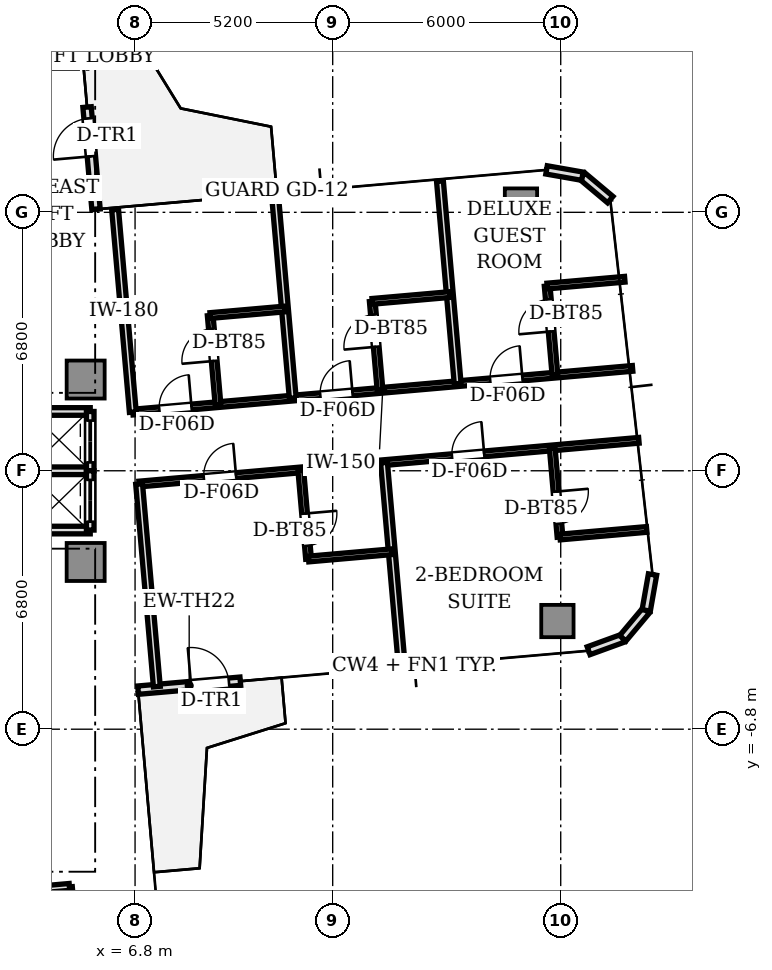
"""IFC4 building model, lengths in metres.
Left out: names, types, materials, properties, quantities, classifications, styles, units other than length and angle.
Written with IfcOpenShell. Run it as: python <this file> out.ifc"""

import sys

from ifc_helpers import new_model, si_unit, direction, frame, frame_2d, origin, origin_2d, place, context, subcontext, project, spatial, rectangle, extrude, source, transform, mapped, element, fill, save


model = new_model("IFC4")
c1 = context("Model", 3, precision=1e-05, world=origin(), true_north=direction((0.0, 1.0)))
c2 = subcontext(c1, "Body", "Model", "MODEL_VIEW")
j1 = project(units=[si_unit("LENGTHUNIT", "METRE"), si_unit("PLANEANGLEUNIT", "RADIAN")], contexts=[c1])
p1 = place(None, origin())
s1 = spatial("IfcSite", under=j1, at=p1, CompositionType="ELEMENT")
p2 = place(p1, origin())
s2 = spatial("IfcBuilding", under=s1, at=p2, CompositionType="ELEMENT")
p3 = place(p2, frame((0.0, 0.0, 191.95)))
s3 = spatial("IfcBuildingStorey", under=s2, at=p3, CompositionType="ELEMENT", Elevation=191.95)
m1 = source(origin(), c2, "Body", "SweptSolid", [
    extrude(rectangle(XDim=1.0, YDim=1.0, at=origin_2d()), origin(), (0.0, 0.0, 1.0), 3.11),
])
for number, where, z_axis, x_axis in (
    (1, (5.5, 2.4, 0.0), (0.0, 0.0, 1.0), (1.0, 0.0, 0.0)),
    (2, (5.5, -2.4, 0.0), (0.0, 0.0, 1.0), (1.0, 0.0, 0.0)),
):
    element("IfcColumn", number, at=place(p3, frame(where, z_axis=z_axis, x_axis=x_axis)), inside=s3, PredefinedType="COLUMN", context=c2, shape_type="MappedRepresentation", body=[
        mapped(m1, transform((0.0, 0.0, 0.0), scale=1.0)),
    ])
m2 = source(origin(), c2, "Body", "SweptSolid", [
    extrude(rectangle(XDim=0.85, YDim=0.85, at=origin_2d()), origin(), (0.0, 0.0, 1.0), 3.11),
])
for number, where, z_axis, x_axis in (
    (3, (17.913, -3.954, 0.0), (0.0, 0.0, 1.0), (1.0, 0.0, 0.0)),
    (4, (16.954, 7.004, 0.0), (0.0, 0.0, 1.0), (1.0, 0.0, 0.0)),
):
    element("IfcColumn", number, at=place(p3, frame(where, z_axis=z_axis, x_axis=x_axis)), inside=s3, PredefinedType="COLUMN", context=c2, shape_type="MappedRepresentation", body=[
        mapped(m2, transform((0.0, 0.0, 0.0), scale=1.0)),
    ])
p4 = place(p3, frame((6.879, -5.772, 0.0), z_axis=(0.0, 0.0, 1.0), x_axis=(0.996193619346, 0.087168071984, 0.0)))
e5 = element("IfcWall", 5, at=p4, inside=s3, PredefinedType="STANDARD", context=c2, shape_type="SweptSolid", body=[
    extrude(rectangle(XDim=2.7, YDim=0.22, at=frame_2d((1.35, 0.0))), origin(), (0.0, 0.0, 1.0), 3.11),
])
p5 = place(p4, frame((1.4, 0.0, 0.0)))
e6 = element("IfcOpeningElement", 6, at=p5, cuts=e5, PredefinedType="OPENING", context=c2, shape_type="SweptSolid", body=[
    extrude(rectangle(XDim=1.0, YDim=2.2, at=frame_2d((0.5, 1.1))), frame((0.0, 0.12, 0.0), z_axis=(0.0, -1.0, 0.0), x_axis=(1.0, 0.0, 0.0)), (0.0, 0.0, 1.0), 0.24),
])
p6 = place(p3, frame((18.734, -4.735, 0.0), z_axis=(0.0, 0.0, 1.0), x_axis=(0.939741306239, 0.34188635151, 0.0)))
e7 = element("IfcWall", 7, at=p6, inside=s3, PredefinedType="STANDARD", context=c2, shape_type="SweptSolid", body=[
    extrude(rectangle(XDim=0.958, YDim=0.22, at=frame_2d((0.479, 0.0))), origin(), (0.0, 0.0, 1.0), 3.11),
])
for number, where, z_axis, x_axis in (
    (8, (19.634, -4.408, 0.0), (0.0, 0.0, 1.0), (0.643, 0.766, 0.0)),
    (9, (20.25, -3.674, 0.0), (0.0, 0.0, 1.0), (0.174, 0.985, 0.0)),
):
    element("IfcWall", number, at=place(p3, frame(where, z_axis=z_axis, x_axis=x_axis)), inside=s3, PredefinedType="STANDARD", context=c2, shape_type="SweptSolid", body=[
        extrude(rectangle(XDim=0.958, YDim=0.22, at=frame_2d((0.479, 0.0))), origin(), (0.0, 0.0, 1.0), 3.11),
    ])
p7 = place(p3, frame((19.304, 7.135, 0.0), z_axis=(0.0, 0.0, 1.0), x_axis=(-0.766001159887, 0.642839189107, 0.0)))
e10 = element("IfcWall", 10, at=p7, inside=s3, PredefinedType="STANDARD", context=c2, shape_type="SweptSolid", body=[
    extrude(rectangle(XDim=0.958, YDim=0.22, at=frame_2d((0.479, 0.0))), origin(), (0.0, 0.0, 1.0), 3.11),
])
p8 = place(p3, frame((18.57, 7.75, 0.0), z_axis=(0.0, 0.0, 1.0), x_axis=(-0.984770724397, 0.173858046606, 0.0)))
e11 = element("IfcWall", 11, at=p8, inside=s3, PredefinedType="STANDARD", context=c2, shape_type="SweptSolid", body=[
    extrude(rectangle(XDim=0.958, YDim=0.22, at=frame_2d((0.479, 0.0))), origin(), (0.0, 0.0, 1.0), 3.11),
])
p9 = place(p3, frame((5.772, 6.879, 0.0), z_axis=(0.0, 0.0, 1.0), x_axis=(-0.087168071984, 0.996193619346, 0.0)))
e12 = element("IfcWall", 12, at=p9, inside=s3, PredefinedType="STANDARD", context=c2, shape_type="SweptSolid", body=[
    extrude(rectangle(XDim=2.7, YDim=0.22, at=frame_2d((1.35, 0.0))), origin(), (0.0, 0.0, 1.0), 3.11),
])
p10 = place(p9, frame((1.4, 0.0, 0.0)))
e13 = element("IfcOpeningElement", 13, at=p10, cuts=e12, PredefinedType="OPENING", context=c2, shape_type="SweptSolid", body=[
    extrude(rectangle(XDim=1.0, YDim=2.2, at=frame_2d((0.5, 1.1))), frame((0.0, 0.12, 0.0), z_axis=(0.0, -1.0, 0.0), x_axis=(1.0, 0.0, 0.0)), (0.0, 0.0, 1.0), 0.24),
])
for number, where, z_axis, x_axis in (
    (14, (3.98, 1.56, 0.0), (0.0, 0.0, 1.0), (1.0, 0.0, 0.0)),
    (15, (3.98, -1.56, 0.0), (0.0, 0.0, 1.0), (1.0, 0.0, 0.0)),
    (16, (3.98, 0.0, 0.0), (0.0, 0.0, 1.0), (1.0, 0.0, 0.0)),
):
    element("IfcWall", number, at=place(p3, frame(where, z_axis=z_axis, x_axis=x_axis)), inside=s3, PredefinedType="SOLIDWALL", context=c2, shape_type="SweptSolid", body=[
        extrude(rectangle(XDim=1.64, YDim=0.2, at=frame_2d((0.82, 0.0))), origin(), (0.0, 0.0, 1.0), 2.66),
    ])
p11 = place(p3, frame((5.62, 0.0, 0.0), z_axis=(0.0, 0.0, 1.0), x_axis=(0.0, 1.0, 0.0)))
e17 = element("IfcWall", 17, at=p11, inside=s3, PredefinedType="SOLIDWALL", context=c2, shape_type="SweptSolid", body=[
    extrude(rectangle(XDim=1.56, YDim=0.2, at=frame_2d((0.78, 0.0))), origin(), (0.0, 0.0, 1.0), 2.66),
])
p12 = place(p11, frame((0.22, 0.0, 0.0)))
e18 = element("IfcOpeningElement", 18, at=p12, cuts=e17, PredefinedType="OPENING", context=c2, shape_type="SweptSolid", body=[
    extrude(rectangle(XDim=1.1, YDim=2.2, at=frame_2d((0.55, 1.1))), frame((0.0, 0.11, 0.0), z_axis=(0.0, -1.0, 0.0), x_axis=(1.0, 0.0, 0.0)), (0.0, 0.0, 1.0), 0.22),
])
p13 = place(p3, frame((5.62, -1.56, 0.0), z_axis=(0.0, 0.0, 1.0), x_axis=(0.0, 1.0, 0.0)))
e19 = element("IfcWall", 19, at=p13, inside=s3, PredefinedType="SOLIDWALL", context=c2, shape_type="SweptSolid", body=[
    extrude(rectangle(XDim=1.56, YDim=0.2, at=frame_2d((0.78, 0.0))), origin(), (0.0, 0.0, 1.0), 2.66),
])
p14 = place(p13, frame((0.22, 0.0, 0.0)))
e20 = element("IfcOpeningElement", 20, at=p14, cuts=e19, PredefinedType="OPENING", context=c2, shape_type="SweptSolid", body=[
    extrude(rectangle(XDim=1.1, YDim=2.2, at=frame_2d((0.55, 1.1))), frame((0.0, 0.11, 0.0), z_axis=(0.0, -1.0, 0.0), x_axis=(1.0, 0.0, 0.0)), (0.0, 0.0, 1.0), 0.22),
])
p15 = place(p3, frame((6.741, 1.543, 0.0), z_axis=(0.0, 0.0, 1.0), x_axis=(0.996195062465, 0.087151577845, 0.0)))
e21 = element("IfcWall", 21, at=p15, inside=s3, PredefinedType="PARTITIONING", context=c2, shape_type="SweptSolid", body=[
    extrude(rectangle(XDim=13.2, YDim=0.15, at=frame_2d((6.6, 0.0))), origin(), (0.0, 0.0, 1.0), 2.66),
])
p16 = place(p15, frame((0.7, 0.0, 0.0)))
e22 = element("IfcOpeningElement", 22, at=p16, cuts=e21, PredefinedType="OPENING", context=c2, shape_type="SweptSolid", body=[
    extrude(rectangle(XDim=0.85, YDim=2.1, at=frame_2d((0.425, 1.05))), frame((0.0, 0.085, 0.0), z_axis=(0.0, -1.0, 0.0), x_axis=(1.0, 0.0, 0.0)), (0.0, 0.0, 1.0), 0.17),
])
p17 = place(p15, frame((4.952, 0.0, 0.0)))
e23 = element("IfcOpeningElement", 23, at=p17, cuts=e21, PredefinedType="OPENING", context=c2, shape_type="SweptSolid", body=[
    extrude(rectangle(XDim=0.85, YDim=2.1, at=frame_2d((0.425, 1.05))), frame((0.0, 0.085, 0.0), z_axis=(0.0, -1.0, 0.0), x_axis=(1.0, 0.0, 0.0)), (0.0, 0.0, 1.0), 0.17),
])
p18 = place(p15, frame((9.44, 0.0, 0.0)))
e24 = element("IfcOpeningElement", 24, at=p18, cuts=e21, PredefinedType="OPENING", context=c2, shape_type="SweptSolid", body=[
    extrude(rectangle(XDim=0.85, YDim=2.1, at=frame_2d((0.425, 1.05))), frame((0.0, 0.085, 0.0), z_axis=(0.0, -1.0, 0.0), x_axis=(1.0, 0.0, 0.0)), (0.0, 0.0, 1.0), 0.17),
])
p19 = place(p3, frame((6.907, -0.349, 0.0), z_axis=(0.0, 0.0, 1.0), x_axis=(0.996195062465, 0.087151577845, 0.0)))
e25 = element("IfcWall", 25, at=p19, inside=s3, PredefinedType="PARTITIONING", context=c2, shape_type="SweptSolid", body=[
    extrude(rectangle(XDim=13.2, YDim=0.15, at=frame_2d((6.6, 0.0))), origin(), (0.0, 0.0, 1.0), 2.66),
])
p20 = place(p19, frame((1.71, 0.0, 0.0)))
e26 = element("IfcOpeningElement", 26, at=p20, cuts=e25, PredefinedType="OPENING", context=c2, shape_type="SweptSolid", body=[
    extrude(rectangle(XDim=0.85, YDim=2.1, at=frame_2d((0.425, 1.05))), frame((0.0, 0.085, 0.0), z_axis=(0.0, -1.0, 0.0), x_axis=(1.0, 0.0, 0.0)), (0.0, 0.0, 1.0), 0.17),
])
p21 = place(p19, frame((8.264, 0.0, 0.0)))
e27 = element("IfcOpeningElement", 27, at=p21, cuts=e25, PredefinedType="OPENING", context=c2, shape_type="SweptSolid", body=[
    extrude(rectangle(XDim=0.85, YDim=2.1, at=frame_2d((0.425, 1.05))), frame((0.0, 0.085, 0.0), z_axis=(0.0, -1.0, 0.0), x_axis=(1.0, 0.0, 0.0)), (0.0, 0.0, 1.0), 0.17),
])
for number, where, z_axis, x_axis in (
    (28, (6.741, 1.543, 0.0), (0.0, 0.0, 1.0), (-0.087, 0.996, 0.0)),
    (29, (7.373, -5.679, 0.0), (0.0, 0.0, 1.0), (-0.087, 0.996, 0.0)),
    (30, (10.949, 1.912, 0.0), (0.0, 0.0, 1.0), (-0.087, 0.996, 0.0)),
):
    element("IfcWall", number, at=place(p3, frame(where, z_axis=z_axis, x_axis=x_axis)), inside=s3, PredefinedType="PARTITIONING", context=c2, shape_type="SweptSolid", body=[
        extrude(rectangle(XDim=5.35, YDim=0.18, at=frame_2d((2.675, 0.0))), origin(), (0.0, 0.0, 1.0), 2.66),
    ])
p22 = place(p3, frame((8.983, 1.74, 0.0), z_axis=(0.0, 0.0, 1.0), x_axis=(-0.087224846905, 0.996188649846, 0.0)))
e31 = element("IfcWall", 31, at=p22, inside=s3, PredefinedType="PARTITIONING", context=c2, shape_type="SweptSolid", body=[
    extrude(rectangle(XDim=2.354, YDim=0.15, at=frame_2d((1.177, 0.0))), origin(), (0.0, 0.0, 1.0), 2.66),
])
p23 = place(p22, frame((1.154, 0.0, 0.0)))
e32 = element("IfcOpeningElement", 32, at=p23, cuts=e31, PredefinedType="OPENING", context=c2, shape_type="SweptSolid", body=[
    extrude(rectangle(XDim=0.85, YDim=2.1, at=frame_2d((0.425, 1.05))), frame((0.0, 0.085, 0.0), z_axis=(0.0, -1.0, 0.0), x_axis=(1.0, 0.0, 0.0)), (0.0, 0.0, 1.0), 0.17),
])
p24 = place(p3, frame((8.777, 4.084, 0.0), z_axis=(0.0, 0.0, 1.0), x_axis=(0.996191703625, 0.087189962887, 0.0)))
e33 = element("IfcWall", 33, at=p24, inside=s3, PredefinedType="PARTITIONING", context=c2, shape_type="SweptSolid", body=[
    extrude(rectangle(XDim=1.974, YDim=0.15, at=frame_2d((0.987, 0.0))), origin(), (0.0, 0.0, 1.0), 2.66),
])
p25 = place(p3, frame((15.289, 2.291, 0.0), z_axis=(0.0, 0.0, 1.0), x_axis=(-0.087161289348, 0.996194212812, 0.0)))
e34 = element("IfcWall", 34, at=p25, inside=s3, PredefinedType="PARTITIONING", context=c2, shape_type="SweptSolid", body=[
    extrude(rectangle(XDim=5.35, YDim=0.18, at=frame_2d((2.675, 0.0))), origin(), (0.0, 0.0, 1.0), 2.66),
])
p26 = place(p3, frame((13.246, 2.113, 0.0), z_axis=(0.0, 0.0, 1.0), x_axis=(-0.087224846905, 0.996188649846, 0.0)))
e35 = element("IfcWall", 35, at=p26, inside=s3, PredefinedType="PARTITIONING", context=c2, shape_type="SweptSolid", body=[
    extrude(rectangle(XDim=2.354, YDim=0.15, at=frame_2d((1.177, 0.0))), origin(), (0.0, 0.0, 1.0), 2.66),
])
p27 = place(p26, frame((1.154, 0.0, 0.0)))
e36 = element("IfcOpeningElement", 36, at=p27, cuts=e35, PredefinedType="OPENING", context=c2, shape_type="SweptSolid", body=[
    extrude(rectangle(XDim=0.85, YDim=2.1, at=frame_2d((0.425, 1.05))), frame((0.0, 0.085, 0.0), z_axis=(0.0, -1.0, 0.0), x_axis=(1.0, 0.0, 0.0)), (0.0, 0.0, 1.0), 0.17),
])
p28 = place(p3, frame((13.041, 4.458, 0.0), z_axis=(0.0, 0.0, 1.0), x_axis=(0.99619307114, 0.087174336889, 0.0)))
e37 = element("IfcWall", 37, at=p28, inside=s3, PredefinedType="PARTITIONING", context=c2, shape_type="SweptSolid", body=[
    extrude(rectangle(XDim=2.05, YDim=0.15, at=frame_2d((1.025, 0.0))), origin(), (0.0, 0.0, 1.0), 2.66),
])
p29 = place(p3, frame((17.849, 2.515, 0.0), z_axis=(0.0, 0.0, 1.0), x_axis=(-0.087121918963, 0.996197656711, 0.0)))
e38 = element("IfcWall", 38, at=p29, inside=s3, PredefinedType="PARTITIONING", context=c2, shape_type="SweptSolid", body=[
    extrude(rectangle(XDim=2.354, YDim=0.15, at=frame_2d((1.177, 0.0))), origin(), (0.0, 0.0, 1.0), 2.66),
])
p30 = place(p29, frame((1.154, 0.0, 0.0)))
e39 = element("IfcOpeningElement", 39, at=p30, cuts=e38, PredefinedType="OPENING", context=c2, shape_type="SweptSolid", body=[
    extrude(rectangle(XDim=0.85, YDim=2.1, at=frame_2d((0.425, 1.05))), frame((0.0, 0.085, 0.0), z_axis=(0.0, -1.0, 0.0), x_axis=(1.0, 0.0, 0.0)), (0.0, 0.0, 1.0), 0.17),
])
p31 = place(p3, frame((17.644, 4.86, 0.0), z_axis=(0.0, 0.0, 1.0), x_axis=(0.99619307114, 0.087174336889, 0.0)))
e40 = element("IfcWall", 40, at=p31, inside=s3, PredefinedType="PARTITIONING", context=c2, shape_type="SweptSolid", body=[
    extrude(rectangle(XDim=2.05, YDim=0.15, at=frame_2d((1.025, 0.0))), origin(), (0.0, 0.0, 1.0), 2.66),
])
p32 = place(p3, frame((13.35, 0.214, 0.0), z_axis=(0.0, 0.0, 1.0), x_axis=(0.087161289348, -0.996194212812, 0.0)))
e41 = element("IfcWall", 41, at=p32, inside=s3, PredefinedType="PARTITIONING", context=c2, shape_type="SweptSolid", body=[
    extrude(rectangle(XDim=5.35, YDim=0.18, at=frame_2d((2.675, 0.0))), origin(), (0.0, 0.0, 1.0), 2.66),
])
p33 = place(p3, frame((11.159, 0.023, 0.0), z_axis=(0.0, 0.0, 1.0), x_axis=(0.087224846905, -0.996188649846, 0.0)))
e42 = element("IfcWall", 42, at=p33, inside=s3, PredefinedType="PARTITIONING", context=c2, shape_type="SweptSolid", body=[
    extrude(rectangle(XDim=2.354, YDim=0.15, at=frame_2d((1.177, 0.0))), origin(), (0.0, 0.0, 1.0), 2.66),
])
p34 = place(p33, frame((1.154, 0.0, 0.0)))
e43 = element("IfcOpeningElement", 43, at=p34, cuts=e42, PredefinedType="OPENING", context=c2, shape_type="SweptSolid", body=[
    extrude(rectangle(XDim=0.85, YDim=2.1, at=frame_2d((0.425, 1.05))), frame((0.0, 0.085, 0.0), z_axis=(0.0, -1.0, 0.0), x_axis=(1.0, 0.0, 0.0)), (0.0, 0.0, 1.0), 0.17),
])
p35 = place(p3, frame((11.365, -2.322, 0.0), z_axis=(0.0, 0.0, 1.0), x_axis=(0.996195042958, 0.087151800816, 0.0)))
e44 = element("IfcWall", 44, at=p35, inside=s3, PredefinedType="PARTITIONING", context=c2, shape_type="SweptSolid", body=[
    extrude(rectangle(XDim=2.199, YDim=0.15, at=frame_2d((1.1, 0.0))), origin(), (0.0, 0.0, 1.0), 2.66),
])
p36 = place(p3, frame((17.776, 0.602, 0.0), z_axis=(0.0, 0.0, 1.0), x_axis=(0.087224846905, -0.996188649846, 0.0)))
e45 = element("IfcWall", 45, at=p36, inside=s3, PredefinedType="PARTITIONING", context=c2, shape_type="SweptSolid", body=[
    extrude(rectangle(XDim=2.354, YDim=0.15, at=frame_2d((1.177, 0.0))), origin(), (0.0, 0.0, 1.0), 2.63),
])
p37 = place(p36, frame((1.154, 0.0, 0.0)))
e46 = element("IfcOpeningElement", 46, at=p37, cuts=e45, PredefinedType="OPENING", context=c2, shape_type="SweptSolid", body=[
    extrude(rectangle(XDim=0.85, YDim=2.1, at=frame_2d((0.425, 1.05))), frame((0.0, 0.085, 0.0), z_axis=(0.0, -1.0, 0.0), x_axis=(1.0, 0.0, 0.0)), (0.0, 0.0, 1.0), 0.17),
])
p38 = place(p3, frame((17.981, -1.743, 0.0), z_axis=(0.0, 0.0, 1.0), x_axis=(0.996196032585, 0.087140488075, 0.0)))
e47 = element("IfcWall", 47, at=p38, inside=s3, PredefinedType="PARTITIONING", context=c2, shape_type="SweptSolid", body=[
    extrude(rectangle(XDim=2.289, YDim=0.15, at=frame_2d((1.145, 0.0))), origin(), (0.0, 0.0, 1.0), 2.66),
])
p39 = place(p3, frame((5.073, -10.949, 0.0), z_axis=(0.0, 0.0, 1.0), x_axis=(0.087199729468, -0.996190848774, 0.0)))
e48 = element("IfcWall", 48, at=p39, inside=s3, PredefinedType="PARTITIONING", context=c2, shape_type="SweptSolid", body=[
    extrude(rectangle(XDim=4.25, YDim=0.15, at=frame_2d((2.125, 0.0))), origin(), (0.0, 0.0, 1.0), 2.66),
])
p40 = place(p39, frame((0.503, 0.0, 0.0)))
e49 = element("IfcOpeningElement", 49, at=p40, cuts=e48, PredefinedType="OPENING", context=c2, shape_type="SweptSolid", body=[
    extrude(rectangle(XDim=0.85, YDim=2.1, at=frame_2d((0.425, 1.05))), frame((0.0, 0.085, 0.0), z_axis=(0.0, -1.0, 0.0), x_axis=(1.0, 0.0, 0.0)), (0.0, 0.0, 1.0), 0.17),
])
p41 = place(p39, frame((2.628, 0.0, 0.0)))
e50 = element("IfcOpeningElement", 50, at=p41, cuts=e48, PredefinedType="OPENING", context=c2, shape_type="SweptSolid", body=[
    extrude(rectangle(XDim=0.85, YDim=2.1, at=frame_2d((0.425, 1.05))), frame((0.0, 0.085, 0.0), z_axis=(0.0, -1.0, 0.0), x_axis=(1.0, 0.0, 0.0)), (0.0, 0.0, 1.0), 0.17),
])
p42 = place(p3, frame((-5.287, -11.856, 0.0), z_axis=(0.0, 0.0, 1.0), x_axis=(0.996194023261, 0.087163455754, 0.0)))
e51 = element("IfcWall", 51, at=p42, inside=s3, PredefinedType="PARTITIONING", context=c2, shape_type="SweptSolid", body=[
    extrude(rectangle(XDim=10.4, YDim=0.18, at=frame_2d((5.2, 0.0))), origin(), (0.0, 0.0, 1.0), 2.66),
])
m3 = source(origin(), c2, "Body", "SweptSolid", [
    extrude(rectangle(XDim=1.0, YDim=0.05, at=origin_2d()), origin(), (0.0, 0.0, 1.0), 2.2),
])
p43 = place(p5, frame((0.5, 0.0, 0.0)))
e52 = element("IfcDoor", 52, at=p43, inside=s3, OperationType="SINGLE_SWING_LEFT", PredefinedType="DOOR", context=c2, shape_type="MappedRepresentation", body=[
    mapped(m3, transform((0.0, 0.0, 0.0), scale=1.0)),
])
fill(e6, e52)
p44 = place(p10, frame((0.5, 0.0, 0.0)))
e53 = element("IfcDoor", 53, at=p44, inside=s3, OperationType="SINGLE_SWING_LEFT", PredefinedType="DOOR", context=c2, shape_type="MappedRepresentation", body=[
    mapped(m3, transform((0.0, 0.0, 0.0), scale=1.0)),
])
fill(e13, e53)
m4 = source(origin(), c2, "Body", "SweptSolid", [
    extrude(rectangle(XDim=1.1, YDim=0.05, at=origin_2d()), origin(), (0.0, 0.0, 1.0), 2.2),
])
p45 = place(p12, frame((0.55, 0.0, 0.0)))
e54 = element("IfcDoor", 54, at=p45, inside=s3, OperationType="DOUBLE_DOOR_SLIDING", PredefinedType="DOOR", context=c2, shape_type="MappedRepresentation", body=[
    mapped(m4, transform((0.0, 0.0, 0.0), scale=1.0)),
])
fill(e18, e54)
p46 = place(p14, frame((0.55, 0.0, 0.0)))
e55 = element("IfcDoor", 55, at=p46, inside=s3, OperationType="DOUBLE_DOOR_SLIDING", PredefinedType="DOOR", context=c2, shape_type="MappedRepresentation", body=[
    mapped(m4, transform((0.0, 0.0, 0.0), scale=1.0)),
])
fill(e20, e55)
m5 = source(origin(), c2, "Body", "SweptSolid", [
    extrude(rectangle(XDim=0.85, YDim=0.05, at=origin_2d()), origin(), (0.0, 0.0, 1.0), 2.1),
])
p47 = place(p23, frame((0.425, 0.0, 0.0)))
e56 = element("IfcDoor", 56, at=p47, inside=s3, OperationType="SINGLE_SWING_LEFT", PredefinedType="DOOR", context=c2, shape_type="MappedRepresentation", body=[
    mapped(m5, transform((0.0, 0.0, 0.0), scale=1.0)),
])
fill(e32, e56)
p48 = place(p16, frame((0.425, 0.0, 0.0)))
e57 = element("IfcDoor", 57, at=p48, inside=s3, OperationType="SINGLE_SWING_RIGHT", PredefinedType="DOOR", context=c2, shape_type="MappedRepresentation", body=[
    mapped(m5, transform((0.0, 0.0, 0.0), scale=1.0)),
])
fill(e22, e57)
p49 = place(p27, frame((0.425, 0.0, 0.0)))
e58 = element("IfcDoor", 58, at=p49, inside=s3, OperationType="SINGLE_SWING_LEFT", PredefinedType="DOOR", context=c2, shape_type="MappedRepresentation", body=[
    mapped(m5, transform((0.0, 0.0, 0.0), scale=1.0)),
])
fill(e36, e58)
p50 = place(p17, frame((0.425, 0.0, 0.0)))
e59 = element("IfcDoor", 59, at=p50, inside=s3, OperationType="SINGLE_SWING_RIGHT", PredefinedType="DOOR", context=c2, shape_type="MappedRepresentation", body=[
    mapped(m5, transform((0.0, 0.0, 0.0), scale=1.0)),
])
fill(e23, e59)
p51 = place(p30, frame((0.425, 0.0, 0.0)))
e60 = element("IfcDoor", 60, at=p51, inside=s3, OperationType="SINGLE_SWING_LEFT", PredefinedType="DOOR", context=c2, shape_type="MappedRepresentation", body=[
    mapped(m5, transform((0.0, 0.0, 0.0), scale=1.0)),
])
fill(e39, e60)
p52 = place(p18, frame((0.425, 0.0, 0.0)))
e61 = element("IfcDoor", 61, at=p52, inside=s3, OperationType="SINGLE_SWING_RIGHT", PredefinedType="DOOR", context=c2, shape_type="MappedRepresentation", body=[
    mapped(m5, transform((0.0, 0.0, 0.0), scale=1.0)),
])
fill(e24, e61)
p53 = place(p34, frame((0.425, 0.0, 0.0)))
e62 = element("IfcDoor", 62, at=p53, inside=s3, OperationType="SINGLE_SWING_LEFT", PredefinedType="DOOR", context=c2, shape_type="MappedRepresentation", body=[
    mapped(m5, transform((0.0, 0.0, 0.0), scale=1.0)),
])
fill(e43, e62)
p54 = place(p20, frame((0.425, 0.0, 0.0)))
e63 = element("IfcDoor", 63, at=p54, inside=s3, OperationType="SINGLE_SWING_RIGHT", PredefinedType="DOOR", context=c2, shape_type="MappedRepresentation", body=[
    mapped(m5, transform((0.0, 0.0, 0.0), scale=1.0)),
])
fill(e26, e63)
p55 = place(p37, frame((0.425, 0.0, 0.0)))
e64 = element("IfcDoor", 64, at=p55, inside=s3, OperationType="SINGLE_SWING_LEFT", PredefinedType="DOOR", context=c2, shape_type="MappedRepresentation", body=[
    mapped(m5, transform((0.0, 0.0, 0.0), scale=1.0)),
])
fill(e46, e64)
p56 = place(p21, frame((0.425, 0.0, 0.0)))
e65 = element("IfcDoor", 65, at=p56, inside=s3, OperationType="SINGLE_SWING_RIGHT", PredefinedType="DOOR", context=c2, shape_type="MappedRepresentation", body=[
    mapped(m5, transform((0.0, 0.0, 0.0), scale=1.0)),
])
fill(e27, e65)
save(model, sys.argv[1])
